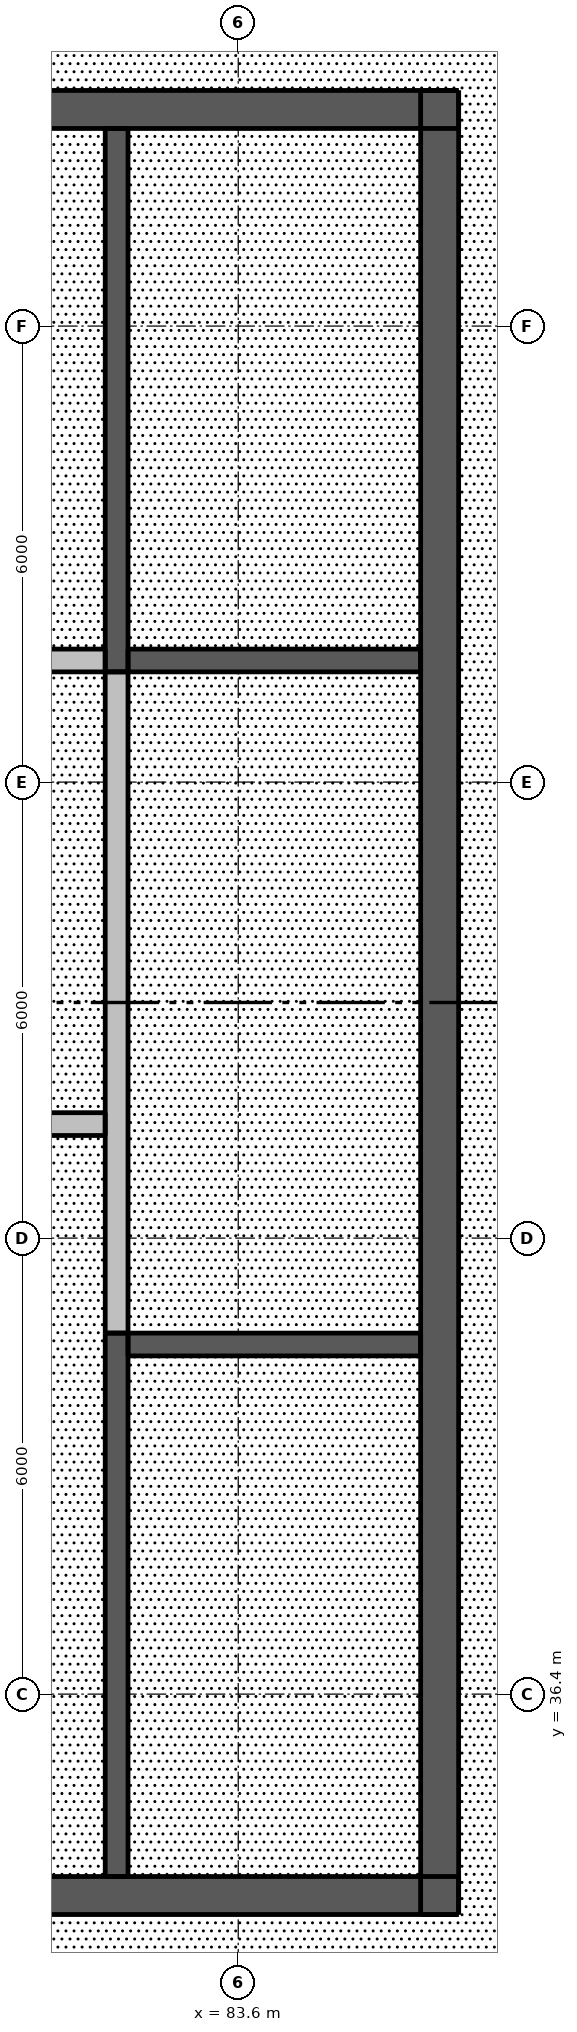
"""IFC4 building model, lengths in metres.
Left out: names, types, materials, properties, quantities, classifications, styles, units other than length and angle.
Written with IfcOpenShell. Run it as: python <this file> out.ifc"""

import sys

from ifc_helpers import new_model, si_unit, direction, frame, frame_2d, origin, place, context, subcontext, project, spatial, rectangle, extrude, element, fill, save


model = new_model("IFC4")
c1 = context("Model", 3, precision=1e-05, world=origin(), true_north=direction((0.0, 1.0)))
c2 = subcontext(c1, "Body", "Model", "MODEL_VIEW")
j1 = project(units=[si_unit("LENGTHUNIT", "METRE"), si_unit("PLANEANGLEUNIT", "RADIAN")], contexts=[c1])
p1 = place(None, origin())
s1 = spatial("IfcSite", under=j1, at=p1, CompositionType="ELEMENT")
p2 = place(p1, origin())
s2 = spatial("IfcBuilding", under=s1, at=p2, CompositionType="ELEMENT")
p3 = place(p2, frame((0.0, 0.0, 298.0)))
s3 = spatial("IfcBuildingStorey", under=s2, at=p3, CompositionType="ELEMENT", Elevation=298.0)
p4 = place(p3, frame((62.5, 33.75, 0.0), z_axis=(0.0, 0.0, 1.0), x_axis=(1.0, 0.0, 0.0)))
e1 = element("IfcWall", 1, at=p4, inside=s3, PredefinedType="SHEAR", context=c2, shape_type="SweptSolid", body=[
    extrude(rectangle(XDim=24.0, YDim=0.5, at=frame_2d((12.0, 0.0))), origin(), (0.0, 0.0, 1.0), 3.3),
])
p5 = place(p4, frame((1.875, 0.0, 0.0)))
e2 = element("IfcOpeningElement", 2, at=p5, cuts=e1, PredefinedType="OPENING", context=c2, shape_type="SweptSolid", body=[
    extrude(rectangle(XDim=1.1, YDim=2.1, at=frame_2d((0.55, 1.05))), frame((0.0, 0.26, 0.0), z_axis=(0.0, -1.0, 0.0), x_axis=(1.0, 0.0, 0.0)), (0.0, 0.0, 1.0), 0.52),
])
p6 = place(p4, frame((21.025, 0.0, 0.0)))
e3 = element("IfcOpeningElement", 3, at=p6, cuts=e1, PredefinedType="OPENING", context=c2, shape_type="SweptSolid", body=[
    extrude(rectangle(XDim=1.1, YDim=2.1, at=frame_2d((0.55, 1.05))), frame((0.0, 0.26, 0.0), z_axis=(0.0, -1.0, 0.0), x_axis=(1.0, 0.0, 0.0)), (0.0, 0.0, 1.0), 0.52),
])
p7 = place(p4, frame((11.55, 0.0, 0.0)))
e4 = element("IfcOpeningElement", 4, at=p7, cuts=e1, PredefinedType="OPENING", context=c2, shape_type="SweptSolid", body=[
    extrude(rectangle(XDim=0.9, YDim=2.1, at=frame_2d((0.45, 1.05))), frame((0.0, 0.26, 0.0), z_axis=(0.0, -1.0, 0.0), x_axis=(1.0, 0.0, 0.0)), (0.0, 0.0, 1.0), 0.52),
])
p8 = place(p3, frame((62.5, 57.25, 0.0), z_axis=(0.0, 0.0, 1.0), x_axis=(1.0, 0.0, 0.0)))
e5 = element("IfcWall", 5, at=p8, inside=s3, PredefinedType="SHEAR", context=c2, shape_type="SweptSolid", body=[
    extrude(rectangle(XDim=24.0, YDim=0.5, at=frame_2d((12.0, 0.0))), origin(), (0.0, 0.0, 1.0), 3.3),
])
p9 = place(p8, frame((21.025, 0.0, 0.0)))
e6 = element("IfcOpeningElement", 6, at=p9, cuts=e5, PredefinedType="OPENING", context=c2, shape_type="SweptSolid", body=[
    extrude(rectangle(XDim=1.1, YDim=2.1, at=frame_2d((0.55, 1.05))), frame((0.0, 0.26, 0.0), z_axis=(0.0, -1.0, 0.0), x_axis=(1.0, 0.0, 0.0)), (0.0, 0.0, 1.0), 0.52),
])
p10 = place(p8, frame((1.875, 0.0, 0.0)))
e7 = element("IfcOpeningElement", 7, at=p10, cuts=e5, PredefinedType="OPENING", context=c2, shape_type="SweptSolid", body=[
    extrude(rectangle(XDim=1.1, YDim=2.1, at=frame_2d((0.55, 1.05))), frame((0.0, 0.26, 0.0), z_axis=(0.0, -1.0, 0.0), x_axis=(1.0, 0.0, 0.0)), (0.0, 0.0, 1.0), 0.52),
])
p11 = place(p8, frame((11.55, 0.0, 0.0)))
e8 = element("IfcOpeningElement", 8, at=p11, cuts=e5, PredefinedType="OPENING", context=c2, shape_type="SweptSolid", body=[
    extrude(rectangle(XDim=0.9, YDim=2.1, at=frame_2d((0.45, 1.05))), frame((0.0, 0.26, 0.0), z_axis=(0.0, -1.0, 0.0), x_axis=(1.0, 0.0, 0.0)), (0.0, 0.0, 1.0), 0.52),
])
p12 = place(p3, frame((86.25, 33.5, 0.0), z_axis=(0.0, 0.0, 1.0), x_axis=(0.0, 1.0, 0.0)))
e9 = element("IfcWall", 9, at=p12, inside=s3, PredefinedType="SHEAR", context=c2, shape_type="SweptSolid", body=[
    extrude(rectangle(XDim=24.0, YDim=0.5, at=frame_2d((12.0, 0.0))), origin(), (0.0, 0.0, 1.0), 3.3),
])
p13 = place(p12, frame((11.55, 0.0, 0.0)))
e10 = element("IfcOpeningElement", 10, at=p13, cuts=e9, PredefinedType="OPENING", context=c2, shape_type="SweptSolid", body=[
    extrude(rectangle(XDim=0.9, YDim=2.1, at=frame_2d((0.45, 1.05))), frame((0.0, 0.26, 0.0), z_axis=(0.0, -1.0, 0.0), x_axis=(1.0, 0.0, 0.0)), (0.0, 0.0, 1.0), 0.52),
])
p14 = place(p3, frame((82.0, 34.0, 0.0), z_axis=(0.0, 0.0, 1.0), x_axis=(0.0, 1.0, 0.0)))
e11 = element("IfcWall", 11, at=p14, inside=s3, PredefinedType="SHEAR", context=c2, shape_type="SweptSolid", body=[
    extrude(rectangle(XDim=7.15, YDim=0.3, at=frame_2d((3.575, 0.0))), origin(), (0.0, 0.0, 1.0), 3.3),
])
p15 = place(p14, frame((0.2, 0.0, 0.0)))
e12 = element("IfcOpeningElement", 12, at=p15, cuts=e11, PredefinedType="OPENING", context=c2, shape_type="SweptSolid", body=[
    extrude(rectangle(XDim=1.1, YDim=2.1, at=frame_2d((0.55, 1.05))), frame((0.0, 0.16, 0.0), z_axis=(0.0, -1.0, 0.0), x_axis=(1.0, 0.0, 0.0)), (0.0, 0.0, 1.0), 0.32),
])
p16 = place(p3, frame((82.0, 41.15, 0.0), z_axis=(0.0, 0.0, 1.0), x_axis=(0.0, 1.0, 0.0)))
e13 = element("IfcWall", 13, at=p16, inside=s3, PredefinedType="PARTITIONING", context=c2, shape_type="SweptSolid", body=[
    extrude(rectangle(XDim=8.7, YDim=0.3, at=frame_2d((4.35, 0.0))), origin(), (0.0, 0.0, 1.0), 3.3),
])
p17 = place(p16, frame((3.9, 0.0, 0.0)))
e14 = element("IfcOpeningElement", 14, at=p17, cuts=e13, PredefinedType="OPENING", context=c2, shape_type="SweptSolid", body=[
    extrude(rectangle(XDim=0.9, YDim=2.1, at=frame_2d((0.45, 1.05))), frame((0.0, 0.16, 0.0), z_axis=(0.0, -1.0, 0.0), x_axis=(1.0, 0.0, 0.0)), (0.0, 0.0, 1.0), 0.32),
])
p18 = place(p3, frame((82.0, 49.85, 0.0), z_axis=(0.0, 0.0, 1.0), x_axis=(0.0, 1.0, 0.0)))
e15 = element("IfcWall", 15, at=p18, inside=s3, PredefinedType="SHEAR", context=c2, shape_type="SweptSolid", body=[
    extrude(rectangle(XDim=7.15, YDim=0.3, at=frame_2d((3.575, 0.0))), origin(), (0.0, 0.0, 1.0), 3.3),
])
p19 = place(p18, frame((5.85, 0.0, 0.0)))
e16 = element("IfcOpeningElement", 16, at=p19, cuts=e15, PredefinedType="OPENING", context=c2, shape_type="SweptSolid", body=[
    extrude(rectangle(XDim=1.1, YDim=2.1, at=frame_2d((0.55, 1.05))), frame((0.0, 0.16, 0.0), z_axis=(0.0, -1.0, 0.0), x_axis=(1.0, 0.0, 0.0)), (0.0, 0.0, 1.0), 0.32),
])
for number, where, z_axis, x_axis in (
    (17, (82.15, 41.0, 0.0), (0.0, 0.0, 1.0), (1.0, 0.0, 0.0)),
    (18, (82.15, 50.0, 0.0), (0.0, 0.0, 1.0), (1.0, 0.0, 0.0)),
):
    element("IfcWall", number, at=place(p3, frame(where, z_axis=z_axis, x_axis=x_axis)), inside=s3, PredefinedType="SHEAR", context=c2, shape_type="SweptSolid", body=[
        extrude(rectangle(XDim=3.85, YDim=0.3, at=frame_2d((1.925, 0.0))), origin(), (0.0, 0.0, 1.0), 3.3),
    ])
p20 = place(p3, frame((67.15, 50.0, 0.0), z_axis=(0.0, 0.0, 1.0), x_axis=(1.0, 0.0, 0.0)))
e19 = element("IfcWall", 19, at=p20, inside=s3, PredefinedType="PARTITIONING", context=c2, shape_type="SweptSolid", body=[
    extrude(rectangle(XDim=14.7, YDim=0.3, at=frame_2d((7.35, 0.0))), origin(), (0.0, 0.0, 1.0), 3.3),
])
p21 = place(p20, frame((6.9, 0.0, 0.0)))
e20 = element("IfcOpeningElement", 20, at=p21, cuts=e19, PredefinedType="OPENING", context=c2, shape_type="SweptSolid", body=[
    extrude(rectangle(XDim=0.9, YDim=2.1, at=frame_2d((0.45, 1.05))), frame((0.0, 0.16, 0.0), z_axis=(0.0, -1.0, 0.0), x_axis=(1.0, 0.0, 0.0)), (0.0, 0.0, 1.0), 0.32),
])
p22 = place(p3, frame((77.0, 43.9, 0.0), z_axis=(0.0, 0.0, 1.0), x_axis=(1.0, 0.0, 0.0)))
e21 = element("IfcWall", 21, at=p22, inside=s3, PredefinedType="PARTITIONING", context=c2, shape_type="SweptSolid", body=[
    extrude(rectangle(XDim=4.85, YDim=0.3, at=frame_2d((2.425, 0.0))), origin(), (0.0, 0.0, 1.0), 3.3),
])
p23 = place(p15, origin())
e22 = element("IfcDoor", 22, at=p23, inside=s3, OperationType="SINGLE_SWING_RIGHT", PredefinedType="DOOR", context=c2, shape_type="SweptSolid", body=[
    extrude(rectangle(XDim=1.1, YDim=2.1, at=frame_2d((0.55, 1.05))), frame((0.0, -0.087, 0.0), z_axis=(0.0, -1.0, 0.0), x_axis=(1.0, 0.0, 0.0)), (0.0, 0.0, 1.0), 0.05),
])
fill(e12, e22)
p24 = place(p19, origin())
e23 = element("IfcDoor", 23, at=p24, inside=s3, OperationType="SINGLE_SWING_RIGHT", PredefinedType="DOOR", context=c2, shape_type="SweptSolid", body=[
    extrude(rectangle(XDim=1.1, YDim=2.1, at=frame_2d((0.55, 1.05))), frame((0.0, -0.087, 0.0), z_axis=(0.0, -1.0, 0.0), x_axis=(1.0, 0.0, 0.0)), (0.0, 0.0, 1.0), 0.05),
])
fill(e16, e23)
p25 = place(p17, origin())
e24 = element("IfcDoor", 24, at=p25, inside=s3, OperationType="SINGLE_SWING_RIGHT", PredefinedType="DOOR", context=c2, shape_type="SweptSolid", body=[
    extrude(rectangle(XDim=0.9, YDim=2.1, at=frame_2d((0.45, 1.05))), frame((0.0, -0.087, 0.0), z_axis=(0.0, -1.0, 0.0), x_axis=(1.0, 0.0, 0.0)), (0.0, 0.0, 1.0), 0.05),
])
fill(e14, e24)
p26 = place(p6, origin())
e25 = element("IfcDoor", 25, at=p26, inside=s3, OperationType="SINGLE_SWING_RIGHT", PredefinedType="DOOR", context=c2, shape_type="SweptSolid", body=[
    extrude(rectangle(XDim=1.1, YDim=2.1, at=frame_2d((0.55, 1.05))), frame((0.0, 0.237, 0.0), z_axis=(0.0, -1.0, 0.0), x_axis=(1.0, 0.0, 0.0)), (0.0, 0.0, 1.0), 0.05),
])
fill(e3, e25)
p27 = place(p9, origin())
e26 = element("IfcDoor", 26, at=p27, inside=s3, OperationType="SINGLE_SWING_RIGHT", PredefinedType="DOOR", context=c2, shape_type="SweptSolid", body=[
    extrude(rectangle(XDim=1.1, YDim=2.1, at=frame_2d((0.55, 1.05))), frame((0.0, -0.188, 0.0), z_axis=(0.0, -1.0, 0.0), x_axis=(1.0, 0.0, 0.0)), (0.0, 0.0, 1.0), 0.05),
])
fill(e6, e26)
p28 = place(p13, origin())
e27 = element("IfcDoor", 27, at=p28, inside=s3, OperationType="SINGLE_SWING_RIGHT", PredefinedType="DOOR", context=c2, shape_type="SweptSolid", body=[
    extrude(rectangle(XDim=0.9, YDim=2.1, at=frame_2d((0.45, 1.05))), frame((0.0, 0.237, 0.0), z_axis=(0.0, -1.0, 0.0), x_axis=(1.0, 0.0, 0.0)), (0.0, 0.0, 1.0), 0.05),
])
fill(e10, e27)
save(model, sys.argv[1])
